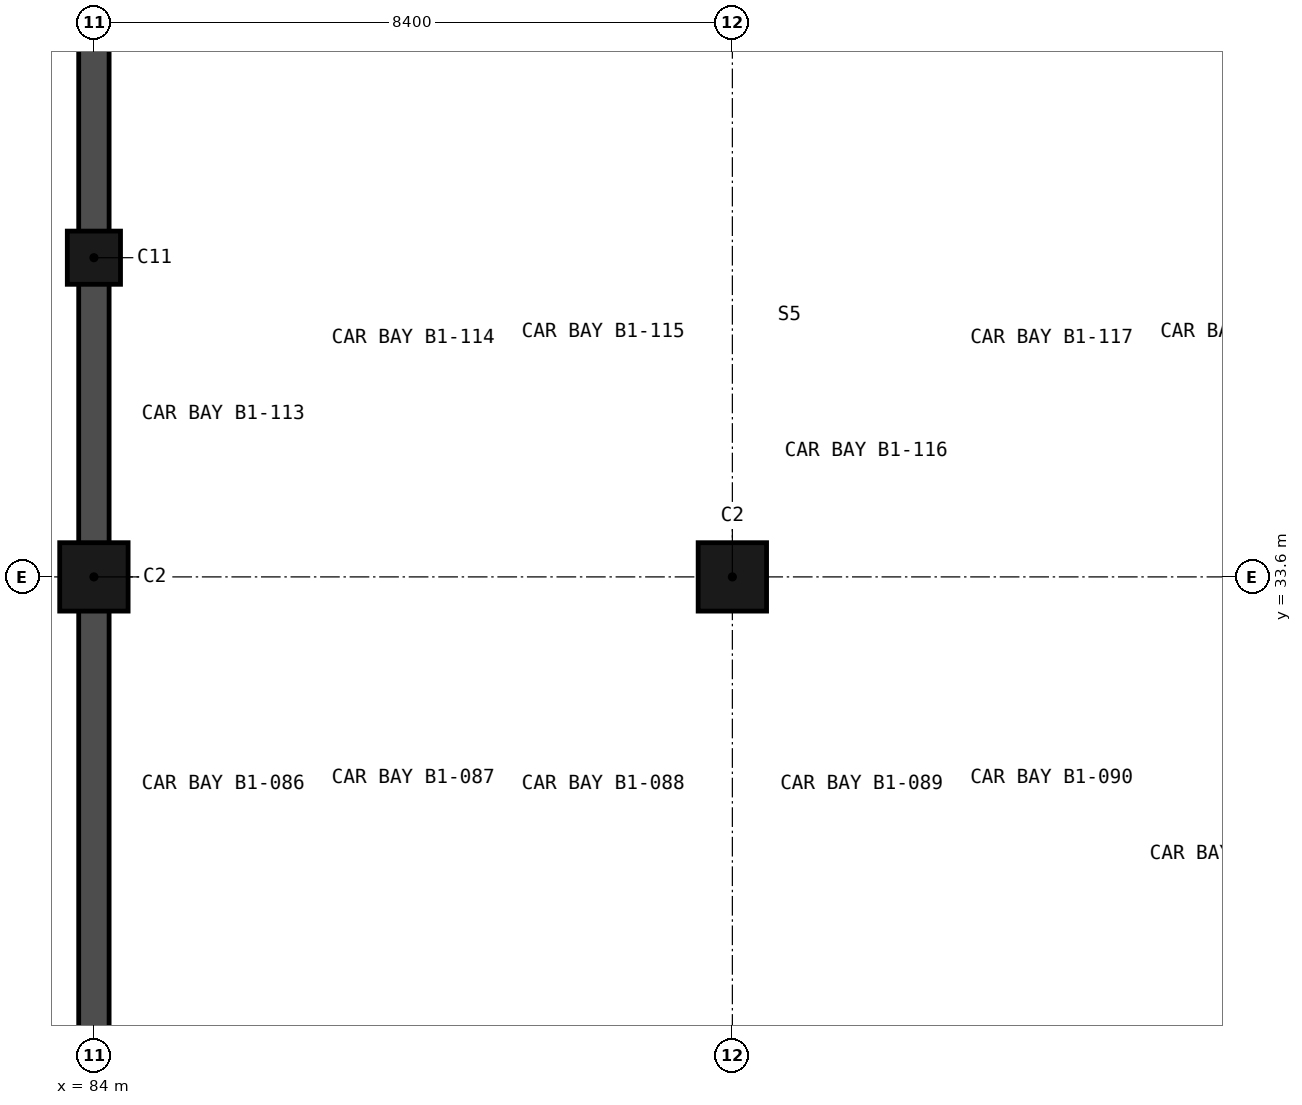
"""IFC4 building model, lengths in metres.
Left out: names, types, materials, properties, quantities, classifications, styles, units other than length and angle.
Written with IfcOpenShell. Run it as: python <this file> out.ifc"""

import sys

from ifc_helpers import new_model, si_unit, direction, frame, frame_2d, origin, origin_2d, place, context, subcontext, project, spatial, rectangle, circle, extrude, element, save


model = new_model("IFC4")
c1 = context("Model", 3, precision=1e-05, world=origin(), true_north=direction((0.0, 1.0)))
c2 = subcontext(c1, "Body", "Model", "MODEL_VIEW")
j1 = project(units=[si_unit("LENGTHUNIT", "METRE"), si_unit("PLANEANGLEUNIT", "RADIAN")], contexts=[c1])
p1 = place(None, origin())
s1 = spatial("IfcSite", under=j1, at=p1, CompositionType="ELEMENT")
p2 = place(p1, origin())
s2 = spatial("IfcBuilding", under=s1, at=p2, CompositionType="ELEMENT")
p3 = place(p2, frame((0.0, 0.0, -4.8)))
s3 = spatial("IfcBuildingStorey", under=s2, at=p3, CompositionType="ELEMENT", Elevation=-4.8)
for number, where, z_axis, x_axis in (
    (1, (84.0, 33.6, -0.3), (0.0, 0.0, 1.0), (1.0, 0.0, 0.0)),
    (2, (92.4, 33.6, -0.3), (0.0, 0.0, 1.0), (1.0, 0.0, 0.0)),
):
    element("IfcColumn", number, at=place(p3, frame(where, z_axis=z_axis, x_axis=x_axis)), inside=s3, PredefinedType="COLUMN", context=c2, shape_type="SweptSolid", body=[
        extrude(rectangle(XDim=0.9, YDim=0.9, at=origin_2d()), origin(), (0.0, 0.0, 1.0), 4.8),
    ])
p4 = place(p3, frame((84.0, 37.8, -0.3), z_axis=(0.0, 0.0, 1.0), x_axis=(1.0, 0.0, 0.0)))
e3 = element("IfcColumn", 3, at=p4, inside=s3, PredefinedType="COLUMN", context=c2, shape_type="SweptSolid", body=[
    extrude(circle(Radius=0.35, at=origin_2d()), origin(), (0.0, 0.0, 1.0), 4.8),
])
p5 = place(p3, frame((84.0, 50.6, -0.3), z_axis=(0.0, 0.0, 1.0), x_axis=(0.0, -1.0, 0.0)))
e4 = element("IfcWall", 4, at=p5, inside=s3, PredefinedType="SOLIDWALL", context=c2, shape_type="SweptSolid", body=[
    extrude(rectangle(XDim=50.8, YDim=0.4, at=frame_2d((25.4, 0.0))), origin(), (0.0, 0.0, 1.0), 4.8),
])
save(model, sys.argv[1])
